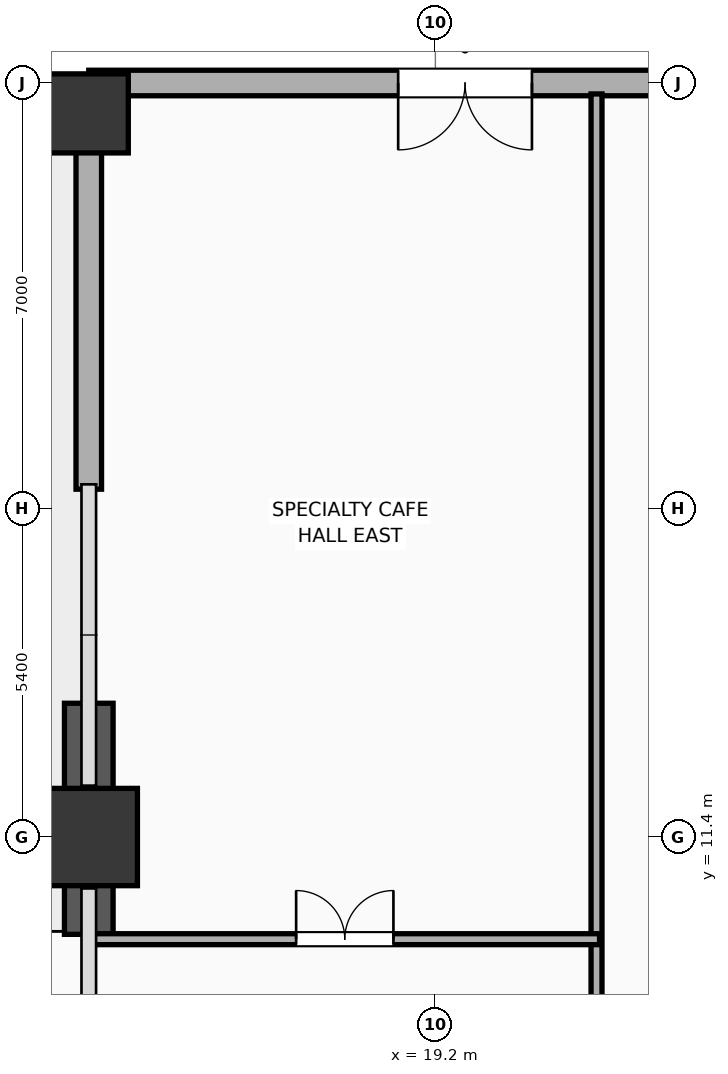
"""IFC4 building model, lengths in metres.
Left out: names, types, materials, properties, quantities, classifications, styles, units other than length and angle.
Written with IfcOpenShell. Run it as: python <this file> out.ifc"""

import sys

from ifc_helpers import new_model, si_unit, direction, frame, frame_2d, origin, origin_2d, place, context, subcontext, project, spatial, rectangle, extrude, element, fill, save


model = new_model("IFC4")
c1 = context("Model", 3, precision=1e-05, world=origin(), true_north=direction((0.0, 1.0)))
c2 = subcontext(c1, "Body", "Model", "MODEL_VIEW")
j1 = project(units=[si_unit("LENGTHUNIT", "METRE"), si_unit("PLANEANGLEUNIT", "RADIAN")], contexts=[c1])
p1 = place(None, origin())
s1 = spatial("IfcSite", under=j1, at=p1, CompositionType="ELEMENT")
p2 = place(p1, origin())
s2 = spatial("IfcBuilding", under=s1, at=p2, CompositionType="ELEMENT")
p3 = place(p2, origin())
s3 = spatial("IfcBuildingStorey", under=s2, at=p3, CompositionType="ELEMENT", Elevation=0.0)
p4 = place(p3, frame((13.5, 11.4, 0.0), z_axis=(0.0, 0.0, 1.0), x_axis=(1.0, 0.0, 0.0)))
e1 = element("IfcColumn", 1, at=p4, inside=s3, PredefinedType="COLUMN", context=c2, shape_type="SweptSolid", body=[
    extrude(rectangle(XDim=1.6, YDim=1.6, at=origin_2d()), origin(), (0.0, 0.0, 1.0), 5.2),
])
p5 = place(p3, frame((13.5, 23.3, 0.0), z_axis=(0.0, 0.0, 1.0), x_axis=(1.0, 0.0, 0.0)))
e2 = element("IfcColumn", 2, at=p5, inside=s3, PredefinedType="COLUMN", context=c2, shape_type="SweptSolid", body=[
    extrude(rectangle(XDim=1.3, YDim=1.3, at=origin_2d()), origin(), (0.0, 0.0, 1.0), 5.2),
])
p6 = place(p3, frame((13.5, 9.8, 0.0), z_axis=(0.0, 0.0, 1.0), x_axis=(0.0, 1.0, 0.0)))
e3 = element("IfcWall", 3, at=p6, inside=s3, PredefinedType="SOLIDWALL", context=c2, shape_type="SweptSolid", body=[
    extrude(rectangle(XDim=3.8, YDim=0.8, at=frame_2d((1.9, 0.0))), origin(), (0.0, 0.0, 1.0), 4.92),
])
p7 = place(p3, frame((35.6, 23.8, 0.0), z_axis=(0.0, 0.0, 1.0), x_axis=(-1.0, 0.0, 0.0)))
e4 = element("IfcWall", 4, at=p7, inside=s3, PredefinedType="ELEMENTEDWALL", context=c2, shape_type="SweptSolid", body=[
    extrude(rectangle(XDim=22.1, YDim=0.42, at=frame_2d((11.05, 0.0))), origin(), (0.0, 0.0, 1.0), 4.92),
])
p8 = place(p7, frame((5.088, 0.0, 0.0)))
e5 = element("IfcOpeningElement", 5, at=p8, cuts=e4, PredefinedType="OPENING", context=c2, shape_type="SweptSolid", body=[
    extrude(rectangle(XDim=2.2, YDim=2.4, at=frame_2d((1.1, 1.2))), frame((0.0, 0.22, 0.0), z_axis=(0.0, -1.0, 0.0), x_axis=(1.0, 0.0, 0.0)), (0.0, 0.0, 1.0), 0.44),
])
p9 = place(p7, frame((14.812, 0.0, 0.0)))
e6 = element("IfcOpeningElement", 6, at=p9, cuts=e4, PredefinedType="OPENING", context=c2, shape_type="SweptSolid", body=[
    extrude(rectangle(XDim=2.2, YDim=2.4, at=frame_2d((1.1, 1.2))), frame((0.0, 0.22, 0.0), z_axis=(0.0, -1.0, 0.0), x_axis=(1.0, 0.0, 0.0)), (0.0, 0.0, 1.0), 0.44),
])
p10 = place(p3, frame((13.5, 17.12, 0.0), z_axis=(0.0, 0.0, 1.0), x_axis=(0.0, 1.0, 0.0)))
e7 = element("IfcWall", 7, at=p10, inside=s3, PredefinedType="ELEMENTEDWALL", context=c2, shape_type="SweptSolid", body=[
    extrude(rectangle(XDim=6.68, YDim=0.42, at=frame_2d((3.34, 0.0))), origin(), (0.0, 0.0, 1.0), 4.21),
])
p11 = place(p3, frame((21.85, -10.5, 0.0), z_axis=(0.0, 0.0, 1.0), x_axis=(0.0, 1.0, 0.0)))
e8 = element("IfcWall", 8, at=p11, inside=s3, PredefinedType="PARTITIONING", context=c2, shape_type="SweptSolid", body=[
    extrude(rectangle(XDim=34.12, YDim=0.18, at=frame_2d((17.06, 0.0))), origin(), (0.0, 0.0, 1.0), 4.92),
])
p12 = place(p11, frame((13.531, 0.0, 0.0)))
e9 = element("IfcOpeningElement", 9, at=p12, cuts=e8, PredefinedType="OPENING", context=c2, shape_type="SweptSolid", body=[
    extrude(rectangle(XDim=1.6, YDim=2.05, at=frame_2d((0.8, 1.025))), frame((0.0, 0.1, 0.0), z_axis=(0.0, -1.0, 0.0), x_axis=(1.0, 0.0, 0.0)), (0.0, 0.0, 1.0), 0.2),
])
p13 = place(p3, frame((13.52, 9.72, 0.0), z_axis=(0.0, 0.0, 1.0), x_axis=(1.0, 0.0, 0.0)))
e10 = element("IfcWall", 10, at=p13, inside=s3, PredefinedType="PARTITIONING", context=c2, shape_type="SweptSolid", body=[
    extrude(rectangle(XDim=8.38, YDim=0.18, at=frame_2d((4.19, 0.0))), origin(), (0.0, 0.0, 1.0), 4.92),
])
p14 = place(p13, frame((3.39, 0.0, 0.0)))
e11 = element("IfcOpeningElement", 11, at=p14, cuts=e10, PredefinedType="OPENING", context=c2, shape_type="SweptSolid", body=[
    extrude(rectangle(XDim=1.6, YDim=2.05, at=frame_2d((0.8, 1.025))), frame((0.0, 0.1, 0.0), z_axis=(0.0, -1.0, 0.0), x_axis=(1.0, 0.0, 0.0)), (0.0, 0.0, 1.0), 0.2),
])
p15 = place(p9, origin())
e12 = element("IfcDoor", 12, at=p15, inside=s3, OperationType="DOUBLE_DOOR_SINGLE_SWING", PredefinedType="DOOR", context=c2, shape_type="SweptSolid", body=[
    extrude(rectangle(XDim=2.2, YDim=2.4, at=frame_2d((1.1, 1.2))), frame((0.0, 0.025, 0.0), z_axis=(0.0, -1.0, 0.0), x_axis=(1.0, 0.0, 0.0)), (0.0, 0.0, 1.0), 0.05),
])
fill(e6, e12)
p16 = place(p14, origin())
e13 = element("IfcDoor", 13, at=p16, inside=s3, OperationType="DOUBLE_DOOR_SINGLE_SWING", PredefinedType="DOOR", context=c2, shape_type="SweptSolid", body=[
    extrude(rectangle(XDim=1.6, YDim=2.05, at=frame_2d((0.8, 1.025))), frame((0.0, 0.025, 0.0), z_axis=(0.0, -1.0, 0.0), x_axis=(1.0, 0.0, 0.0)), (0.0, 0.0, 1.0), 0.05),
])
fill(e11, e13)
save(model, sys.argv[1])
